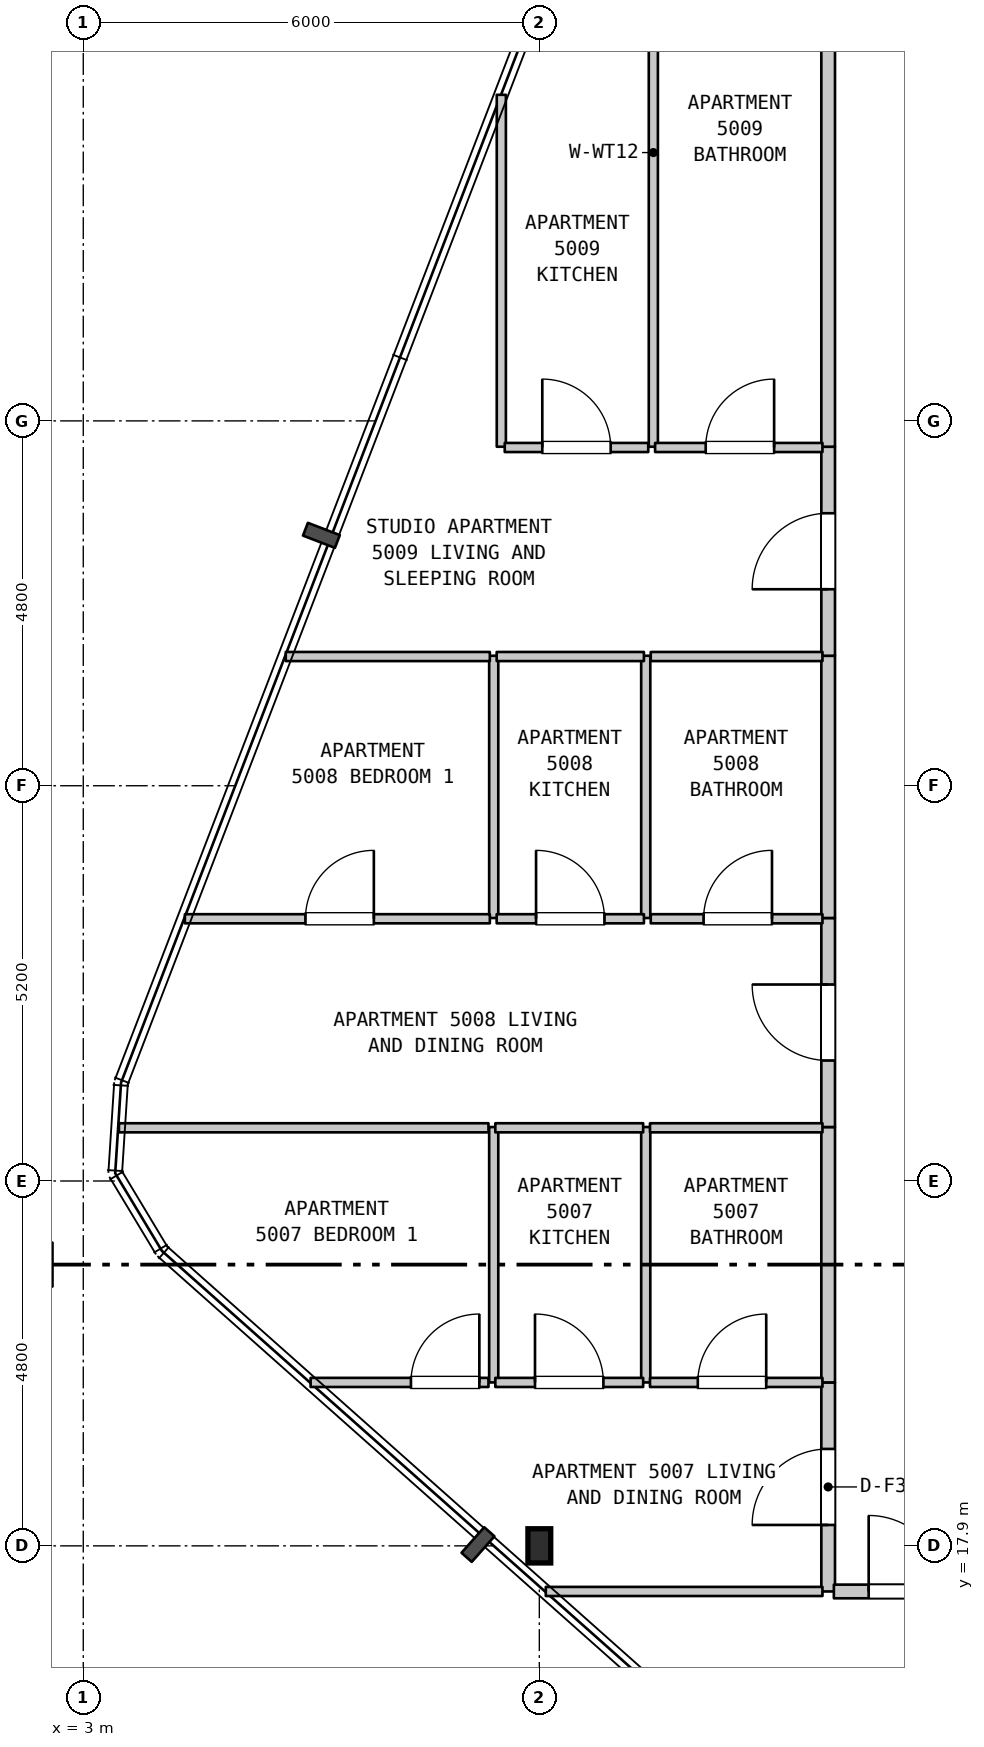
"""IFC4 building model, lengths in metres.
Left out: names, types, materials, properties, quantities, classifications, styles, units other than length and angle.
Written with IfcOpenShell. Run it as: python <this file> out.ifc"""

import sys

from ifc_helpers import new_model, si_unit, direction, frame, frame_2d, origin, origin_2d, place, context, subcontext, project, spatial, rectangle, i_section, extrude, element, fill, save


model = new_model("IFC4")
c1 = context("Model", 3, precision=1e-05, world=origin(), true_north=direction((0.0, 1.0)))
c2 = subcontext(c1, "Body", "Model", "MODEL_VIEW")
j1 = project(units=[si_unit("LENGTHUNIT", "METRE"), si_unit("PLANEANGLEUNIT", "RADIAN")], contexts=[c1])
p1 = place(None, origin())
s1 = spatial("IfcSite", under=j1, at=p1, CompositionType="ELEMENT")
p2 = place(p1, origin())
s2 = spatial("IfcBuilding", under=s1, at=p2, CompositionType="ELEMENT")
p3 = place(p2, frame((0.0, 0.0, 203.2)))
s3 = spatial("IfcBuildingStorey", under=s2, at=p3, CompositionType="ELEMENT", Elevation=203.2)
p4 = place(p3, frame((9.0, 17.9, 0.0), z_axis=(0.0, 0.0, 1.0), x_axis=(1.0, 0.0, 0.0)))
e1 = element("IfcColumn", 1, at=p4, inside=s3, PredefinedType="COLUMN", context=c2, shape_type="SweptSolid", body=[
    extrude(i_section(OverallWidth=0.3, OverallDepth=0.45, WebThickness=0.014, FlangeThickness=0.026, FilletRadius=0.027, at=origin_2d()), origin(), (0.0, 0.0, 1.0), 3.7),
])
p5 = place(p3, frame((8.4, 20.05, 0.0), z_axis=(0.0, 0.0, 1.0), x_axis=(0.0, 1.0, 0.0)))
e2 = element("IfcWall", 2, at=p5, inside=s3, PredefinedType="PARTITIONING", context=c2, shape_type="SweptSolid", body=[
    extrude(rectangle(XDim=3.36, YDim=0.12, at=frame_2d((1.68, 0.0))), origin(), (0.0, 0.0, 1.0), 3.39),
])
p6 = place(p3, frame((8.4, 26.16, 0.0), z_axis=(0.0, 0.0, 1.0), x_axis=(0.0, 1.0, 0.0)))
e3 = element("IfcWall", 3, at=p6, inside=s3, PredefinedType="PARTITIONING", context=c2, shape_type="SweptSolid", body=[
    extrude(rectangle(XDim=3.45, YDim=0.12, at=frame_2d((1.725, 0.0))), origin(), (0.0, 0.0, 1.0), 3.39),
])
p7 = place(p3, frame((8.5, 32.36, 0.0), z_axis=(0.0, 0.0, 1.0), x_axis=(0.0, 1.0, 0.0)))
e4 = element("IfcWall", 4, at=p7, inside=s3, PredefinedType="PARTITIONING", context=c2, shape_type="SweptSolid", body=[
    extrude(rectangle(XDim=4.63, YDim=0.12, at=frame_2d((2.315, 0.0))), origin(), (0.0, 0.0, 1.0), 3.39),
])
p8 = place(p3, frame((10.4, 20.05, 0.0), z_axis=(0.0, 0.0, 1.0), x_axis=(0.0, 1.0, 0.0)))
e5 = element("IfcWall", 5, at=p8, inside=s3, PredefinedType="PARTITIONING", context=c2, shape_type="SweptSolid", body=[
    extrude(rectangle(XDim=3.36, YDim=0.12, at=frame_2d((1.68, 0.0))), origin(), (0.0, 0.0, 1.0), 3.39),
])
p9 = place(p3, frame((10.4, 26.16, 0.0), z_axis=(0.0, 0.0, 1.0), x_axis=(0.0, 1.0, 0.0)))
e6 = element("IfcWall", 6, at=p9, inside=s3, PredefinedType="PARTITIONING", context=c2, shape_type="SweptSolid", body=[
    extrude(rectangle(XDim=3.45, YDim=0.12, at=frame_2d((1.725, 0.0))), origin(), (0.0, 0.0, 1.0), 3.39),
])
p10 = place(p3, frame((10.5, 32.36, 0.0), z_axis=(0.0, 0.0, 1.0), x_axis=(0.0, 1.0, 0.0)))
e7 = element("IfcWall", 7, at=p10, inside=s3, PredefinedType="PARTITIONING", context=c2, shape_type="SweptSolid", body=[
    extrude(rectangle(XDim=7.74, YDim=0.12, at=frame_2d((3.87, 0.0))), origin(), (0.0, 0.0, 1.0), 3.39),
])
p11 = place(p3, frame((12.8, 17.3, 0.0), z_axis=(0.0, 0.0, 1.0), x_axis=(0.0, 1.0, 0.0)))
e8 = element("IfcWall", 8, at=p11, inside=s3, PredefinedType="STANDARD", context=c2, shape_type="SweptSolid", body=[
    extrude(rectangle(XDim=2.75, YDim=0.18, at=frame_2d((1.375, 0.0))), origin(), (0.0, 0.0, 1.0), 3.39),
])
p12 = place(p11, frame((0.875, 0.0, 0.0)))
e9 = element("IfcOpeningElement", 9, at=p12, cuts=e8, PredefinedType="OPENING", context=c2, shape_type="SweptSolid", body=[
    extrude(rectangle(XDim=1.0, YDim=2.15, at=frame_2d((0.5, 1.075))), frame((0.0, 0.1, 0.0), z_axis=(0.0, -1.0, 0.0), x_axis=(1.0, 0.0, 0.0)), (0.0, 0.0, 1.0), 0.2),
])
p13 = place(p3, frame((12.8, 20.05, 0.0), z_axis=(0.0, 0.0, 1.0), x_axis=(0.0, 1.0, 0.0)))
e10 = element("IfcWall", 10, at=p13, inside=s3, PredefinedType="STANDARD", context=c2, shape_type="SweptSolid", body=[
    extrude(rectangle(XDim=3.36, YDim=0.18, at=frame_2d((1.68, 0.0))), origin(), (0.0, 0.0, 1.0), 3.39),
])
p14 = place(p3, frame((12.8, 23.41, 0.0), z_axis=(0.0, 0.0, 1.0), x_axis=(0.0, 1.0, 0.0)))
e11 = element("IfcWall", 11, at=p14, inside=s3, PredefinedType="STANDARD", context=c2, shape_type="SweptSolid", body=[
    extrude(rectangle(XDim=2.75, YDim=0.18, at=frame_2d((1.375, 0.0))), origin(), (0.0, 0.0, 1.0), 3.39),
])
p15 = place(p14, frame((0.875, 0.0, 0.0)))
e12 = element("IfcOpeningElement", 12, at=p15, cuts=e11, PredefinedType="OPENING", context=c2, shape_type="SweptSolid", body=[
    extrude(rectangle(XDim=1.0, YDim=2.15, at=frame_2d((0.5, 1.075))), frame((0.0, 0.1, 0.0), z_axis=(0.0, -1.0, 0.0), x_axis=(1.0, 0.0, 0.0)), (0.0, 0.0, 1.0), 0.2),
])
p16 = place(p3, frame((12.8, 26.16, 0.0), z_axis=(0.0, 0.0, 1.0), x_axis=(0.0, 1.0, 0.0)))
e13 = element("IfcWall", 13, at=p16, inside=s3, PredefinedType="STANDARD", context=c2, shape_type="SweptSolid", body=[
    extrude(rectangle(XDim=3.45, YDim=0.18, at=frame_2d((1.725, 0.0))), origin(), (0.0, 0.0, 1.0), 3.39),
])
p17 = place(p3, frame((12.8, 29.61, 0.0), z_axis=(0.0, 0.0, 1.0), x_axis=(0.0, 1.0, 0.0)))
e14 = element("IfcWall", 14, at=p17, inside=s3, PredefinedType="STANDARD", context=c2, shape_type="SweptSolid", body=[
    extrude(rectangle(XDim=2.75, YDim=0.18, at=frame_2d((1.375, 0.0))), origin(), (0.0, 0.0, 1.0), 3.39),
])
p18 = place(p17, frame((0.875, 0.0, 0.0)))
e15 = element("IfcOpeningElement", 15, at=p18, cuts=e14, PredefinedType="OPENING", context=c2, shape_type="SweptSolid", body=[
    extrude(rectangle(XDim=1.0, YDim=2.15, at=frame_2d((0.5, 1.075))), frame((0.0, 0.1, 0.0), z_axis=(0.0, -1.0, 0.0), x_axis=(1.0, 0.0, 0.0)), (0.0, 0.0, 1.0), 0.2),
])
p19 = place(p3, frame((12.8, 32.36, 0.0), z_axis=(0.0, 0.0, 1.0), x_axis=(0.0, 1.0, 0.0)))
e16 = element("IfcWall", 16, at=p19, inside=s3, PredefinedType="STANDARD", context=c2, shape_type="SweptSolid", body=[
    extrude(rectangle(XDim=7.74, YDim=0.18, at=frame_2d((3.87, 0.0))), origin(), (0.0, 0.0, 1.0), 3.39),
])
p20 = place(p3, frame((9.085, 17.3, 0.0), z_axis=(0.0, 0.0, 1.0), x_axis=(1.0, 0.0, 0.0)))
e17 = element("IfcWall", 17, at=p20, inside=s3, PredefinedType="PARTITIONING", context=c2, shape_type="SweptSolid", body=[
    extrude(rectangle(XDim=3.64, YDim=0.12, at=frame_2d((1.82, 0.0))), origin(), (0.0, 0.0, 1.0), 3.39),
])
p21 = place(p3, frame((12.875, 17.3, 0.0), z_axis=(0.0, 0.0, 1.0), x_axis=(1.0, 0.0, 0.0)))
e18 = element("IfcWall", 18, at=p21, inside=s3, PredefinedType="STANDARD", context=c2, shape_type="SweptSolid", body=[
    extrude(rectangle(XDim=3.78, YDim=0.18, at=frame_2d((1.89, 0.0))), origin(), (0.0, 0.0, 1.0), 3.39),
])
p22 = place(p21, frame((0.458, 0.0, 0.0)))
e19 = element("IfcOpeningElement", 19, at=p22, cuts=e18, PredefinedType="OPENING", context=c2, shape_type="SweptSolid", body=[
    extrude(rectangle(XDim=1.0, YDim=2.15, at=frame_2d((0.5, 1.075))), frame((0.0, 0.1, 0.0), z_axis=(0.0, -1.0, 0.0), x_axis=(1.0, 0.0, 0.0)), (0.0, 0.0, 1.0), 0.2),
])
p23 = place(p3, frame((5.991, 20.05, 0.0), z_axis=(0.0, 0.0, 1.0), x_axis=(1.0, 0.0, 0.0)))
e20 = element("IfcWall", 20, at=p23, inside=s3, PredefinedType="PARTITIONING", context=c2, shape_type="SweptSolid", body=[
    extrude(rectangle(XDim=2.34, YDim=0.12, at=frame_2d((1.17, 0.0))), origin(), (0.0, 0.0, 1.0), 3.39),
])
p24 = place(p23, frame((1.32, 0.0, 0.0)))
e21 = element("IfcOpeningElement", 21, at=p24, cuts=e20, PredefinedType="OPENING", context=c2, shape_type="SweptSolid", body=[
    extrude(rectangle(XDim=0.9, YDim=2.15, at=frame_2d((0.45, 1.075))), frame((0.0, 0.07, 0.0), z_axis=(0.0, -1.0, 0.0), x_axis=(1.0, 0.0, 0.0)), (0.0, 0.0, 1.0), 0.14),
])
p25 = place(p3, frame((8.421, 20.05, 0.0), z_axis=(0.0, 0.0, 1.0), x_axis=(1.0, 0.0, 0.0)))
e22 = element("IfcWall", 22, at=p25, inside=s3, PredefinedType="PARTITIONING", context=c2, shape_type="SweptSolid", body=[
    extrude(rectangle(XDim=1.945, YDim=0.12, at=frame_2d((0.973, 0.0))), origin(), (0.0, 0.0, 1.0), 3.39),
])
p26 = place(p25, frame((0.522, 0.0, 0.0)))
e23 = element("IfcOpeningElement", 23, at=p26, cuts=e22, PredefinedType="OPENING", context=c2, shape_type="SweptSolid", body=[
    extrude(rectangle(XDim=0.9, YDim=2.15, at=frame_2d((0.45, 1.075))), frame((0.0, 0.07, 0.0), z_axis=(0.0, -1.0, 0.0), x_axis=(1.0, 0.0, 0.0)), (0.0, 0.0, 1.0), 0.14),
])
p27 = place(p3, frame((10.456, 20.05, 0.0), z_axis=(0.0, 0.0, 1.0), x_axis=(1.0, 0.0, 0.0)))
e24 = element("IfcWall", 24, at=p27, inside=s3, PredefinedType="PARTITIONING", context=c2, shape_type="SweptSolid", body=[
    extrude(rectangle(XDim=2.269, YDim=0.12, at=frame_2d((1.135, 0.0))), origin(), (0.0, 0.0, 1.0), 3.39),
])
p28 = place(p27, frame((0.629, 0.0, 0.0)))
e25 = element("IfcOpeningElement", 25, at=p28, cuts=e24, PredefinedType="OPENING", context=c2, shape_type="SweptSolid", body=[
    extrude(rectangle(XDim=0.9, YDim=2.1, at=frame_2d((0.45, 1.05))), frame((0.0, 0.07, 0.0), z_axis=(0.0, -1.0, 0.0), x_axis=(1.0, 0.0, 0.0)), (0.0, 0.0, 1.0), 0.14),
])
p29 = place(p3, frame((3.469, 23.4, 0.0), z_axis=(0.0, 0.0, 1.0), x_axis=(1.0, 0.0, 0.0)))
e26 = element("IfcWall", 26, at=p29, inside=s3, PredefinedType="PARTITIONING", context=c2, shape_type="SweptSolid", body=[
    extrude(rectangle(XDim=4.862, YDim=0.12, at=frame_2d((2.431, 0.0))), origin(), (0.0, 0.0, 1.0), 3.39),
])
p30 = place(p3, frame((8.421, 23.4, 0.0), z_axis=(0.0, 0.0, 1.0), x_axis=(1.0, 0.0, 0.0)))
e27 = element("IfcWall", 27, at=p30, inside=s3, PredefinedType="PARTITIONING", context=c2, shape_type="SweptSolid", body=[
    extrude(rectangle(XDim=1.945, YDim=0.12, at=frame_2d((0.973, 0.0))), origin(), (0.0, 0.0, 1.0), 3.39),
])
p31 = place(p3, frame((10.456, 23.4, 0.0), z_axis=(0.0, 0.0, 1.0), x_axis=(1.0, 0.0, 0.0)))
e28 = element("IfcWall", 28, at=p31, inside=s3, PredefinedType="PARTITIONING", context=c2, shape_type="SweptSolid", body=[
    extrude(rectangle(XDim=2.269, YDim=0.12, at=frame_2d((1.135, 0.0))), origin(), (0.0, 0.0, 1.0), 3.39),
])
p32 = place(p3, frame((4.337, 26.15, 0.0), z_axis=(0.0, 0.0, 1.0), x_axis=(1.0, 0.0, 0.0)))
e29 = element("IfcWall", 29, at=p32, inside=s3, PredefinedType="PARTITIONING", context=c2, shape_type="SweptSolid", body=[
    extrude(rectangle(XDim=4.012, YDim=0.12, at=frame_2d((2.006, 0.0))), origin(), (0.0, 0.0, 1.0), 3.39),
])
p33 = place(p32, frame((1.586, 0.0, 0.0)))
e30 = element("IfcOpeningElement", 30, at=p33, cuts=e29, PredefinedType="OPENING", context=c2, shape_type="SweptSolid", body=[
    extrude(rectangle(XDim=0.9, YDim=2.15, at=frame_2d((0.45, 1.075))), frame((0.0, 0.07, 0.0), z_axis=(0.0, -1.0, 0.0), x_axis=(1.0, 0.0, 0.0)), (0.0, 0.0, 1.0), 0.14),
])
p34 = place(p3, frame((8.439, 26.15, 0.0), z_axis=(0.0, 0.0, 1.0), x_axis=(1.0, 0.0, 0.0)))
e31 = element("IfcWall", 31, at=p34, inside=s3, PredefinedType="PARTITIONING", context=c2, shape_type="SweptSolid", body=[
    extrude(rectangle(XDim=1.937, YDim=0.12, at=frame_2d((0.969, 0.0))), origin(), (0.0, 0.0, 1.0), 3.39),
])
p35 = place(p34, frame((0.518, 0.0, 0.0)))
e32 = element("IfcOpeningElement", 32, at=p35, cuts=e31, PredefinedType="OPENING", context=c2, shape_type="SweptSolid", body=[
    extrude(rectangle(XDim=0.9, YDim=2.15, at=frame_2d((0.45, 1.075))), frame((0.0, 0.07, 0.0), z_axis=(0.0, -1.0, 0.0), x_axis=(1.0, 0.0, 0.0)), (0.0, 0.0, 1.0), 0.14),
])
p36 = place(p3, frame((10.466, 26.15, 0.0), z_axis=(0.0, 0.0, 1.0), x_axis=(1.0, 0.0, 0.0)))
e33 = element("IfcWall", 33, at=p36, inside=s3, PredefinedType="PARTITIONING", context=c2, shape_type="SweptSolid", body=[
    extrude(rectangle(XDim=2.259, YDim=0.12, at=frame_2d((1.129, 0.0))), origin(), (0.0, 0.0, 1.0), 3.39),
])
p37 = place(p36, frame((0.695, 0.0, 0.0)))
e34 = element("IfcOpeningElement", 34, at=p37, cuts=e33, PredefinedType="OPENING", context=c2, shape_type="SweptSolid", body=[
    extrude(rectangle(XDim=0.9, YDim=2.1, at=frame_2d((0.45, 1.05))), frame((0.0, 0.07, 0.0), z_axis=(0.0, -1.0, 0.0), x_axis=(1.0, 0.0, 0.0)), (0.0, 0.0, 1.0), 0.14),
])
p38 = place(p3, frame((5.664, 29.6, 0.0), z_axis=(0.0, 0.0, 1.0), x_axis=(1.0, 0.0, 0.0)))
e35 = element("IfcWall", 35, at=p38, inside=s3, PredefinedType="PARTITIONING", context=c2, shape_type="SweptSolid", body=[
    extrude(rectangle(XDim=2.685, YDim=0.12, at=frame_2d((1.343, 0.0))), origin(), (0.0, 0.0, 1.0), 3.39),
])
p39 = place(p3, frame((8.439, 29.6, 0.0), z_axis=(0.0, 0.0, 1.0), x_axis=(1.0, 0.0, 0.0)))
e36 = element("IfcWall", 36, at=p39, inside=s3, PredefinedType="PARTITIONING", context=c2, shape_type="SweptSolid", body=[
    extrude(rectangle(XDim=1.937, YDim=0.12, at=frame_2d((0.969, 0.0))), origin(), (0.0, 0.0, 1.0), 3.39),
])
p40 = place(p3, frame((10.466, 29.6, 0.0), z_axis=(0.0, 0.0, 1.0), x_axis=(1.0, 0.0, 0.0)))
e37 = element("IfcWall", 37, at=p40, inside=s3, PredefinedType="PARTITIONING", context=c2, shape_type="SweptSolid", body=[
    extrude(rectangle(XDim=2.259, YDim=0.12, at=frame_2d((1.129, 0.0))), origin(), (0.0, 0.0, 1.0), 3.39),
])
p41 = place(p3, frame((8.545, 32.35, 0.0), z_axis=(0.0, 0.0, 1.0), x_axis=(1.0, 0.0, 0.0)))
e38 = element("IfcWall", 38, at=p41, inside=s3, PredefinedType="PARTITIONING", context=c2, shape_type="SweptSolid", body=[
    extrude(rectangle(XDim=1.888, YDim=0.12, at=frame_2d((0.944, 0.0))), origin(), (0.0, 0.0, 1.0), 3.39),
])
p42 = place(p41, frame((0.494, 0.0, 0.0)))
e39 = element("IfcOpeningElement", 39, at=p42, cuts=e38, PredefinedType="OPENING", context=c2, shape_type="SweptSolid", body=[
    extrude(rectangle(XDim=0.9, YDim=2.15, at=frame_2d((0.45, 1.075))), frame((0.0, 0.07, 0.0), z_axis=(0.0, -1.0, 0.0), x_axis=(1.0, 0.0, 0.0)), (0.0, 0.0, 1.0), 0.14),
])
p43 = place(p3, frame((10.523, 32.35, 0.0), z_axis=(0.0, 0.0, 1.0), x_axis=(1.0, 0.0, 0.0)))
e40 = element("IfcWall", 40, at=p43, inside=s3, PredefinedType="PARTITIONING", context=c2, shape_type="SweptSolid", body=[
    extrude(rectangle(XDim=2.202, YDim=0.12, at=frame_2d((1.101, 0.0))), origin(), (0.0, 0.0, 1.0), 3.39),
])
p44 = place(p43, frame((0.666, 0.0, 0.0)))
e41 = element("IfcOpeningElement", 41, at=p44, cuts=e40, PredefinedType="OPENING", context=c2, shape_type="SweptSolid", body=[
    extrude(rectangle(XDim=0.9, YDim=2.1, at=frame_2d((0.45, 1.05))), frame((0.0, 0.07, 0.0), z_axis=(0.0, -1.0, 0.0), x_axis=(1.0, 0.0, 0.0)), (0.0, 0.0, 1.0), 0.14),
])
p45 = place(p12, origin())
e42 = element("IfcDoor", 42, at=p45, inside=s3, OperationType="SINGLE_SWING_LEFT", PredefinedType="DOOR", context=c2, shape_type="SweptSolid", body=[
    extrude(rectangle(XDim=1.0, YDim=2.15, at=frame_2d((0.5, 1.075))), frame((0.0, 0.025, 0.0), z_axis=(0.0, -1.0, 0.0), x_axis=(1.0, 0.0, 0.0)), (0.0, 0.0, 1.0), 0.05),
])
fill(e9, e42)
p46 = place(p15, origin())
e43 = element("IfcDoor", 43, at=p46, inside=s3, OperationType="SINGLE_SWING_RIGHT", PredefinedType="DOOR", context=c2, shape_type="SweptSolid", body=[
    extrude(rectangle(XDim=1.0, YDim=2.15, at=frame_2d((0.5, 1.075))), frame((0.0, 0.025, 0.0), z_axis=(0.0, -1.0, 0.0), x_axis=(1.0, 0.0, 0.0)), (0.0, 0.0, 1.0), 0.05),
])
fill(e12, e43)
p47 = place(p18, origin())
e44 = element("IfcDoor", 44, at=p47, inside=s3, OperationType="SINGLE_SWING_LEFT", PredefinedType="DOOR", context=c2, shape_type="SweptSolid", body=[
    extrude(rectangle(XDim=1.0, YDim=2.15, at=frame_2d((0.5, 1.075))), frame((0.0, 0.025, 0.0), z_axis=(0.0, -1.0, 0.0), x_axis=(1.0, 0.0, 0.0)), (0.0, 0.0, 1.0), 0.05),
])
fill(e15, e44)
p48 = place(p22, origin())
e45 = element("IfcDoor", 45, at=p48, inside=s3, OperationType="SINGLE_SWING_LEFT", PredefinedType="DOOR", context=c2, shape_type="SweptSolid", body=[
    extrude(rectangle(XDim=1.0, YDim=2.15, at=frame_2d((0.5, 1.075))), frame((0.0, 0.025, 0.0), z_axis=(0.0, -1.0, 0.0), x_axis=(1.0, 0.0, 0.0)), (0.0, 0.0, 1.0), 0.05),
])
fill(e19, e45)
p49 = place(p24, origin())
e46 = element("IfcDoor", 46, at=p49, inside=s3, OperationType="SINGLE_SWING_RIGHT", PredefinedType="DOOR", context=c2, shape_type="SweptSolid", body=[
    extrude(rectangle(XDim=0.9, YDim=2.15, at=frame_2d((0.45, 1.075))), frame((0.0, 0.025, 0.0), z_axis=(0.0, -1.0, 0.0), x_axis=(1.0, 0.0, 0.0)), (0.0, 0.0, 1.0), 0.05),
])
fill(e21, e46)
p50 = place(p26, origin())
e47 = element("IfcDoor", 47, at=p50, inside=s3, OperationType="SINGLE_SWING_LEFT", PredefinedType="DOOR", context=c2, shape_type="SweptSolid", body=[
    extrude(rectangle(XDim=0.9, YDim=2.15, at=frame_2d((0.45, 1.075))), frame((0.0, 0.025, 0.0), z_axis=(0.0, -1.0, 0.0), x_axis=(1.0, 0.0, 0.0)), (0.0, 0.0, 1.0), 0.05),
])
fill(e23, e47)
p51 = place(p28, origin())
e48 = element("IfcDoor", 48, at=p51, inside=s3, OperationType="SINGLE_SWING_RIGHT", PredefinedType="DOOR", context=c2, shape_type="SweptSolid", body=[
    extrude(rectangle(XDim=0.9, YDim=2.1, at=frame_2d((0.45, 1.05))), frame((0.0, 0.025, 0.0), z_axis=(0.0, -1.0, 0.0), x_axis=(1.0, 0.0, 0.0)), (0.0, 0.0, 1.0), 0.05),
])
fill(e25, e48)
p52 = place(p33, origin())
e49 = element("IfcDoor", 49, at=p52, inside=s3, OperationType="SINGLE_SWING_RIGHT", PredefinedType="DOOR", context=c2, shape_type="SweptSolid", body=[
    extrude(rectangle(XDim=0.9, YDim=2.15, at=frame_2d((0.45, 1.075))), frame((0.0, 0.025, 0.0), z_axis=(0.0, -1.0, 0.0), x_axis=(1.0, 0.0, 0.0)), (0.0, 0.0, 1.0), 0.05),
])
fill(e30, e49)
p53 = place(p35, origin())
e50 = element("IfcDoor", 50, at=p53, inside=s3, OperationType="SINGLE_SWING_LEFT", PredefinedType="DOOR", context=c2, shape_type="SweptSolid", body=[
    extrude(rectangle(XDim=0.9, YDim=2.15, at=frame_2d((0.45, 1.075))), frame((0.0, 0.025, 0.0), z_axis=(0.0, -1.0, 0.0), x_axis=(1.0, 0.0, 0.0)), (0.0, 0.0, 1.0), 0.05),
])
fill(e32, e50)
p54 = place(p37, origin())
e51 = element("IfcDoor", 51, at=p54, inside=s3, OperationType="SINGLE_SWING_RIGHT", PredefinedType="DOOR", context=c2, shape_type="SweptSolid", body=[
    extrude(rectangle(XDim=0.9, YDim=2.1, at=frame_2d((0.45, 1.05))), frame((0.0, 0.025, 0.0), z_axis=(0.0, -1.0, 0.0), x_axis=(1.0, 0.0, 0.0)), (0.0, 0.0, 1.0), 0.05),
])
fill(e34, e51)
p55 = place(p42, origin())
e52 = element("IfcDoor", 52, at=p55, inside=s3, OperationType="SINGLE_SWING_LEFT", PredefinedType="DOOR", context=c2, shape_type="SweptSolid", body=[
    extrude(rectangle(XDim=0.9, YDim=2.15, at=frame_2d((0.45, 1.075))), frame((0.0, 0.025, 0.0), z_axis=(0.0, -1.0, 0.0), x_axis=(1.0, 0.0, 0.0)), (0.0, 0.0, 1.0), 0.05),
])
fill(e39, e52)
p56 = place(p44, origin())
e53 = element("IfcDoor", 53, at=p56, inside=s3, OperationType="SINGLE_SWING_RIGHT", PredefinedType="DOOR", context=c2, shape_type="SweptSolid", body=[
    extrude(rectangle(XDim=0.9, YDim=2.1, at=frame_2d((0.45, 1.05))), frame((0.0, 0.025, 0.0), z_axis=(0.0, -1.0, 0.0), x_axis=(1.0, 0.0, 0.0)), (0.0, 0.0, 1.0), 0.05),
])
fill(e41, e53)
save(model, sys.argv[1])
